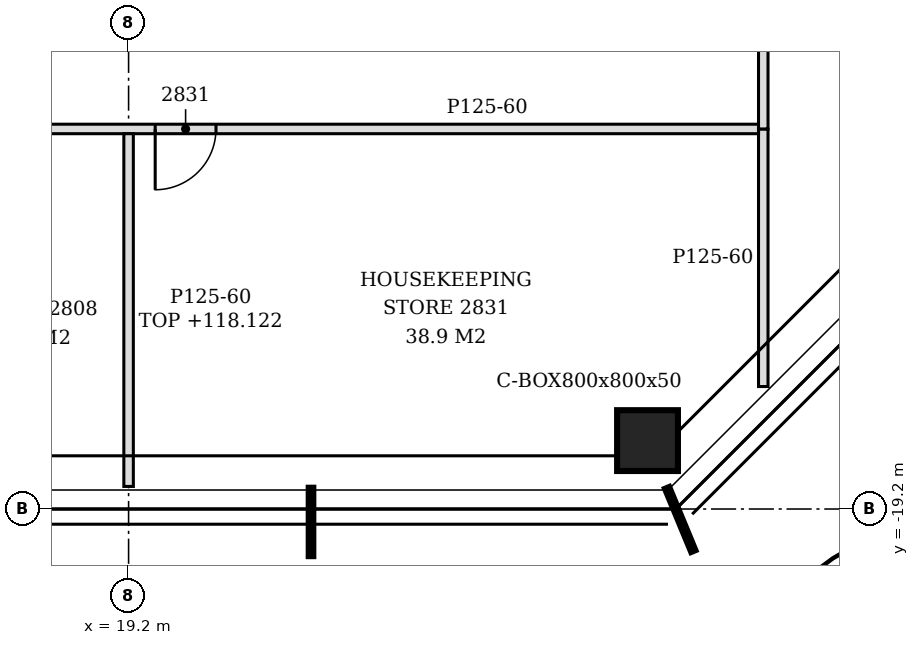
"""IFC4 building model, lengths in metres.
Left out: names, types, materials, properties, quantities, classifications, styles, units other than length and angle.
Written with IfcOpenShell. Run it as: python <this file> out.ifc"""

import sys

from ifc_helpers import new_model, si_unit, direction, frame, frame_2d, origin, origin_2d, place, context, subcontext, project, spatial, polyline, rectangle, hollow_rectangle, outline, extrude, clip, halfspace, element, fill, save


model = new_model("IFC4")
c1 = context("Model", 3, precision=1e-05, world=origin(), true_north=direction((0.0, 1.0)))
c2 = subcontext(c1, "Body", "Model", "MODEL_VIEW")
j1 = project(units=[si_unit("LENGTHUNIT", "METRE"), si_unit("PLANEANGLEUNIT", "RADIAN")], contexts=[c1])
p1 = place(None, origin())
s1 = spatial("IfcSite", under=j1, at=p1, CompositionType="ELEMENT")
p2 = place(p1, origin())
s2 = spatial("IfcBuilding", under=s1, at=p2, CompositionType="ELEMENT")
p3 = place(p2, frame((0.0, 0.0, 115.8)))
s3 = spatial("IfcBuildingStorey", under=s2, at=p3, CompositionType="ELEMENT", Elevation=115.8)
p4 = place(p3, frame((26.027, -18.3, -0.15), z_axis=(0.0, 0.0, 1.0), x_axis=(1.0, 0.0, 0.0)))
e1 = element("IfcColumn", 1, at=p4, inside=s3, PredefinedType="COLUMN", context=c2, shape_type="Clipping", body=[
    clip(clip(extrude(hollow_rectangle(XDim=0.8, YDim=0.8, WallThickness=0.05, at=origin_2d()), origin(), (0.0, 0.0, 1.0), 3.5), halfspace(frame((0.0, 0.0, 0.021), z_axis=(0.0, 0.0, 1.0), x_axis=(1.0, 0.0, 0.0)), True)), halfspace(frame((0.0, 0.0, 3.05), z_axis=(0.0, 0.0, 1.0), x_axis=(1.0, 0.0, 0.0)), False)),
])
p5 = place(p3, frame((19.2, -18.903, 0.0), z_axis=(0.0, 0.0, 1.0), x_axis=(0.0, 1.0, 0.0)))
e2 = element("IfcWall", 2, at=p5, inside=s3, PredefinedType="PARTITIONING", context=c2, shape_type="SweptSolid", body=[
    extrude(rectangle(XDim=4.641, YDim=0.125, at=frame_2d((2.32, 0.0))), origin(), (0.0, 0.0, 1.0), 2.322),
])
p6 = place(p3, frame((27.55, -17.589, 0.0), z_axis=(0.0, 0.0, 1.0), x_axis=(0.0, 1.0, 0.0)))
e3 = element("IfcWall", 3, at=p6, inside=s3, PredefinedType="PARTITIONING", context=c2, shape_type="SweptSolid", body=[
    extrude(outline(polyline([(0.0, 0.0), (3.389, 0.0), (3.389, 3.35), (3.289, 3.35), (3.287, 2.83), (3.089, 2.83), (3.087, 3.35), (1.581, 3.35), (1.579, 2.33), (0.042, 2.33), (0.04, 3.35), (0.0, 3.35), (0.0, 0.0)])), frame((0.0, 0.062, 0.0), z_axis=(0.0, -1.0, 0.0), x_axis=(1.0, 0.0, 0.0)), (0.0, 0.0, 1.0), 0.125),
])
p7 = place(p3, frame((-14.4, -14.2, 0.0), z_axis=(0.0, 0.0, 1.0), x_axis=(1.0, 0.0, 0.0)))
e4 = element("IfcWall", 4, at=p7, inside=s3, PredefinedType="PARTITIONING", context=c2, shape_type="SweptSolid", body=[
    extrude(outline(polyline([(0.0, 0.0), (41.887, 0.0), (41.887, 3.35), (33.751, 3.35), (33.749, 2.322), (33.449, 2.322), (33.447, 3.35), (21.75, 3.35), (21.748, 2.83), (21.45, 2.83), (21.448, 3.35), (9.75, 3.35), (9.748, 2.83), (9.45, 2.83), (9.448, 3.35), (0.15, 3.35), (0.148, 2.93), (0.0, 2.93), (0.0, 0.0)])), frame((0.0, 0.062, 0.0), z_axis=(0.0, -1.0, 0.0), x_axis=(1.0, 0.0, 0.0)), (0.0, 0.0, 1.0), 0.125),
])
p8 = place(p7, frame((1.3, 0.0, 0.0)))
e5 = element("IfcOpeningElement", 5, at=p8, cuts=e4, PredefinedType="OPENING", context=c2, shape_type="SweptSolid", body=[
    extrude(rectangle(XDim=0.8, YDim=2.1, at=frame_2d((0.4, 1.05))), frame((0.0, 0.073, 0.0), z_axis=(0.0, -1.0, 0.0), x_axis=(1.0, 0.0, 0.0)), (0.0, 0.0, 1.0), 0.145),
])
p9 = place(p7, frame((6.0, 0.0, 0.0)))
e6 = element("IfcOpeningElement", 6, at=p9, cuts=e4, PredefinedType="OPENING", context=c2, shape_type="SweptSolid", body=[
    extrude(rectangle(XDim=0.9, YDim=2.1, at=frame_2d((0.45, 1.05))), frame((0.0, 0.073, 0.0), z_axis=(0.0, -1.0, 0.0), x_axis=(1.0, 0.0, 0.0)), (0.0, 0.0, 1.0), 0.145),
])
p10 = place(p7, frame((10.986, 0.0, 0.0)))
e7 = element("IfcOpeningElement", 7, at=p10, cuts=e4, PredefinedType="OPENING", context=c2, shape_type="SweptSolid", body=[
    extrude(rectangle(XDim=0.9, YDim=2.1, at=frame_2d((0.45, 1.05))), frame((0.0, 0.073, 0.0), z_axis=(0.0, -1.0, 0.0), x_axis=(1.0, 0.0, 0.0)), (0.0, 0.0, 1.0), 0.145),
])
p11 = place(p7, frame((15.6, 0.0, 0.0)))
e8 = element("IfcOpeningElement", 8, at=p11, cuts=e4, PredefinedType="OPENING", context=c2, shape_type="SweptSolid", body=[
    extrude(rectangle(XDim=0.9, YDim=2.1, at=frame_2d((0.45, 1.05))), frame((0.0, 0.073, 0.0), z_axis=(0.0, -1.0, 0.0), x_axis=(1.0, 0.0, 0.0)), (0.0, 0.0, 1.0), 0.145),
])
p12 = place(p7, frame((20.4, 0.0, 0.0)))
e9 = element("IfcOpeningElement", 9, at=p12, cuts=e4, PredefinedType="OPENING", context=c2, shape_type="SweptSolid", body=[
    extrude(rectangle(XDim=0.9, YDim=2.1, at=frame_2d((0.45, 1.05))), frame((0.0, 0.073, 0.0), z_axis=(0.0, -1.0, 0.0), x_axis=(1.0, 0.0, 0.0)), (0.0, 0.0, 1.0), 0.145),
])
p13 = place(p7, frame((23.4, 0.0, 0.0)))
e10 = element("IfcOpeningElement", 10, at=p13, cuts=e4, PredefinedType="OPENING", context=c2, shape_type="SweptSolid", body=[
    extrude(rectangle(XDim=0.9, YDim=2.1, at=frame_2d((0.45, 1.05))), frame((0.0, 0.073, 0.0), z_axis=(0.0, -1.0, 0.0), x_axis=(1.0, 0.0, 0.0)), (0.0, 0.0, 1.0), 0.145),
])
p14 = place(p7, frame((26.714, 0.0, 0.0)))
e11 = element("IfcOpeningElement", 11, at=p14, cuts=e4, PredefinedType="OPENING", context=c2, shape_type="SweptSolid", body=[
    extrude(rectangle(XDim=0.9, YDim=2.1, at=frame_2d((0.45, 1.05))), frame((0.0, 0.073, 0.0), z_axis=(0.0, -1.0, 0.0), x_axis=(1.0, 0.0, 0.0)), (0.0, 0.0, 1.0), 0.145),
])
p15 = place(p7, frame((31.6, 0.0, 0.0)))
e12 = element("IfcOpeningElement", 12, at=p15, cuts=e4, PredefinedType="OPENING", context=c2, shape_type="SweptSolid", body=[
    extrude(rectangle(XDim=0.9, YDim=2.1, at=frame_2d((0.45, 1.05))), frame((0.0, 0.073, 0.0), z_axis=(0.0, -1.0, 0.0), x_axis=(1.0, 0.0, 0.0)), (0.0, 0.0, 1.0), 0.145),
])
p16 = place(p7, frame((33.95, 0.0, 0.0)))
e13 = element("IfcOpeningElement", 13, at=p16, cuts=e4, PredefinedType="OPENING", context=c2, shape_type="SweptSolid", body=[
    extrude(rectangle(XDim=0.8, YDim=2.1, at=frame_2d((0.4, 1.05))), frame((0.0, 0.073, 0.0), z_axis=(0.0, -1.0, 0.0), x_axis=(1.0, 0.0, 0.0)), (0.0, 0.0, 1.0), 0.145),
])
p17 = place(p3, frame((27.55, -14.2, 0.0), z_axis=(0.0, 0.0, 1.0), x_axis=(0.0, 1.0, 0.0)))
e14 = element("IfcWall", 14, at=p17, inside=s3, PredefinedType="PARTITIONING", context=c2, shape_type="SweptSolid", body=[
    extrude(outline(polyline([(0.0, 0.0), (27.4, 0.0), (27.4, 3.35), (24.3, 3.35), (24.298, 2.33), (23.3, 2.33), (23.298, 3.35), (19.11, 3.35), (19.108, 2.73), (18.89, 2.73), (18.888, 3.35), (14.7, 3.35), (14.698, 2.33), (13.7, 2.33), (13.698, 3.35), (9.51, 3.35), (9.508, 2.73), (9.29, 2.73), (9.288, 3.35), (4.71, 3.35), (4.708, 2.73), (4.49, 2.73), (4.488, 3.35), (0.0, 3.35), (0.0, 0.0)])), frame((0.0, 0.062, 0.0), z_axis=(0.0, -1.0, 0.0), x_axis=(1.0, 0.0, 0.0)), (0.0, 0.0, 1.0), 0.125),
])
p18 = place(p17, frame((7.3, 0.0, 0.0)))
e15 = element("IfcOpeningElement", 15, at=p18, cuts=e14, PredefinedType="OPENING", context=c2, shape_type="SweptSolid", body=[
    extrude(rectangle(XDim=1.8, YDim=2.1, at=frame_2d((0.9, 1.05))), frame((0.0, 0.073, 0.0), z_axis=(0.0, -1.0, 0.0), x_axis=(1.0, 0.0, 0.0)), (0.0, 0.0, 1.0), 0.145),
])
p19 = place(p17, frame((9.724, 0.0, 0.0)))
e16 = element("IfcOpeningElement", 16, at=p19, cuts=e14, PredefinedType="OPENING", context=c2, shape_type="SweptSolid", body=[
    extrude(rectangle(XDim=0.9, YDim=2.1, at=frame_2d((0.45, 1.05))), frame((0.0, 0.073, 0.0), z_axis=(0.0, -1.0, 0.0), x_axis=(1.0, 0.0, 0.0)), (0.0, 0.0, 1.0), 0.145),
])
p20 = place(p17, frame((16.6, 0.0, 0.0)))
e17 = element("IfcOpeningElement", 17, at=p20, cuts=e14, PredefinedType="OPENING", context=c2, shape_type="SweptSolid", body=[
    extrude(rectangle(XDim=0.9, YDim=2.1, at=frame_2d((0.45, 1.05))), frame((0.0, 0.073, 0.0), z_axis=(0.0, -1.0, 0.0), x_axis=(1.0, 0.0, 0.0)), (0.0, 0.0, 1.0), 0.145),
])
p21 = place(p17, frame((22.476, 0.0, 0.0)))
e18 = element("IfcOpeningElement", 18, at=p21, cuts=e14, PredefinedType="OPENING", context=c2, shape_type="SweptSolid", body=[
    extrude(rectangle(XDim=0.9, YDim=2.1, at=frame_2d((0.45, 1.05))), frame((0.0, 0.073, 0.0), z_axis=(0.0, -1.0, 0.0), x_axis=(1.0, 0.0, 0.0)), (0.0, 0.0, 1.0), 0.145),
])
p22 = place(p17, frame((24.0, 0.0, 0.0)))
e19 = element("IfcOpeningElement", 19, at=p22, cuts=e14, PredefinedType="OPENING", context=c2, shape_type="SweptSolid", body=[
    extrude(rectangle(XDim=0.9, YDim=2.1, at=frame_2d((0.45, 1.05))), frame((0.0, 0.073, 0.0), z_axis=(0.0, -1.0, 0.0), x_axis=(1.0, 0.0, 0.0)), (0.0, 0.0, 1.0), 0.145),
])
p23 = place(p16, frame((0.8, 0.0, 0.0), z_axis=(0.0, 0.0, 1.0), x_axis=(-1.0, 0.0, 0.0)))
e20 = element("IfcDoor", 20, at=p23, inside=s3, OperationType="SINGLE_SWING_RIGHT", PredefinedType="DOOR", context=c2, shape_type="SweptSolid", body=[
    extrude(rectangle(XDim=0.8, YDim=2.1, at=frame_2d((0.4, 1.05))), frame((0.0, 0.025, 0.0), z_axis=(0.0, -1.0, 0.0), x_axis=(1.0, 0.0, 0.0)), (0.0, 0.0, 1.0), 0.05),
])
fill(e13, e20)
save(model, sys.argv[1])
